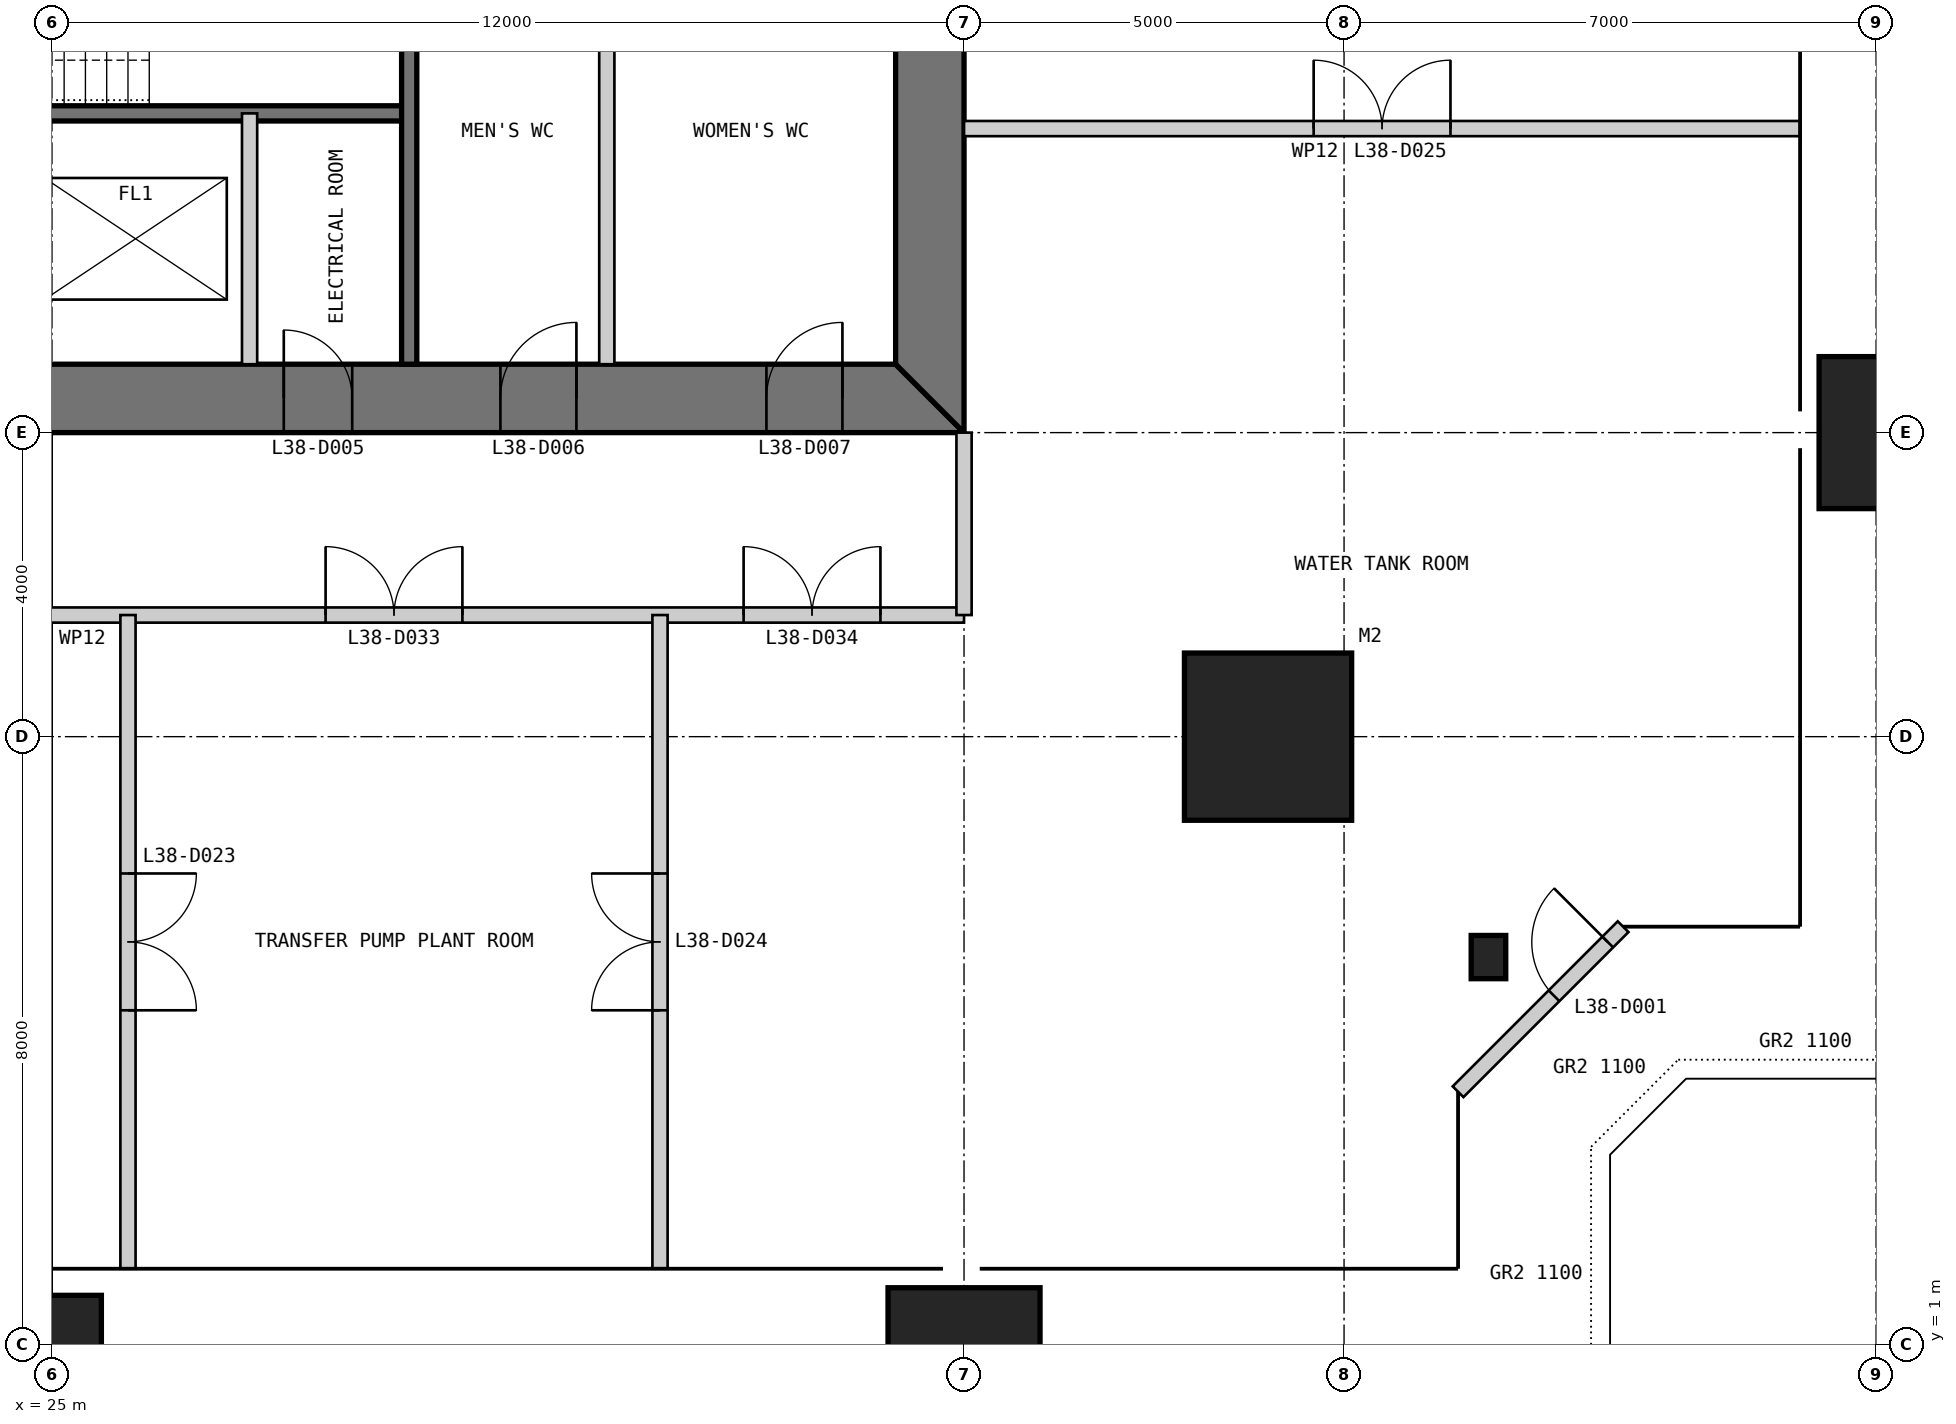
"""IFC4 building model, lengths in metres.
Left out: names, types, materials, properties, quantities, classifications, styles, units other than length and angle.
Written with IfcOpenShell. Run it as: python <this file> out.ifc"""

import sys

from ifc_helpers import new_model, si_unit, direction, frame, frame_2d, origin, origin_2d, place, context, subcontext, project, spatial, polyline, rectangle, i_section, outline, extrude, element, fill, save


model = new_model("IFC4")
c1 = context("Model", 3, precision=1e-05, world=origin(), true_north=direction((0.0, 1.0)))
c2 = subcontext(c1, "Body", "Model", "MODEL_VIEW")
j1 = project(units=[si_unit("LENGTHUNIT", "METRE"), si_unit("PLANEANGLEUNIT", "RADIAN")], contexts=[c1])
p1 = place(None, origin())
s1 = spatial("IfcSite", under=j1, at=p1, CompositionType="ELEMENT")
p2 = place(p1, origin())
s2 = spatial("IfcBuilding", under=s1, at=p2, CompositionType="ELEMENT")
p3 = place(p2, frame((0.0, 0.0, 162.4)))
s3 = spatial("IfcBuildingStorey", under=s2, at=p3, CompositionType="ELEMENT", Elevation=162.4)
p4 = place(p3, frame((41.0, 9.0, 0.0), z_axis=(0.0, 0.0, 1.0), x_axis=(1.0, 0.0, 0.0)))
e1 = element("IfcColumn", 1, at=p4, inside=s3, PredefinedType="COLUMN", context=c2, shape_type="SweptSolid", body=[
    extrude(rectangle(XDim=2.2, YDim=2.2, at=origin_2d()), origin(), (0.0, 0.0, 1.0), 6.0),
])
p5 = place(p3, frame((25.0, 1.0, 0.0), z_axis=(0.0, 0.0, 1.0), x_axis=(1.0, 0.0, 0.0)))
e2 = element("IfcColumn", 2, at=p5, inside=s3, PredefinedType="COLUMN", context=c2, shape_type="SweptSolid", body=[
    extrude(rectangle(XDim=1.3, YDim=1.3, at=origin_2d()), origin(), (0.0, 0.0, 1.0), 6.0),
])
p6 = place(p3, frame((37.0, 1.0, 0.0), z_axis=(0.0, 0.0, 1.0), x_axis=(1.0, 0.0, 0.0)))
e3 = element("IfcColumn", 3, at=p6, inside=s3, PredefinedType="COLUMN", context=c2, shape_type="SweptSolid", body=[
    extrude(rectangle(XDim=2.0, YDim=1.5, at=origin_2d()), origin(), (0.0, 0.0, 1.0), 6.0),
])
p7 = place(p3, frame((49.0, 13.0, 0.0), z_axis=(0.0, 0.0, 1.0), x_axis=(1.0, 0.0, 0.0)))
e4 = element("IfcColumn", 4, at=p7, inside=s3, PredefinedType="COLUMN", context=c2, shape_type="SweptSolid", body=[
    extrude(rectangle(XDim=1.5, YDim=2.0, at=origin_2d()), origin(), (0.0, 0.0, 1.0), 6.0),
])
p8 = place(p3, frame((43.9, 6.1, 0.0), z_axis=(0.0, 0.0, 1.0), x_axis=(1.0, 0.0, 0.0)))
e5 = element("IfcColumn", 5, at=p8, inside=s3, PredefinedType="COLUMN", context=c2, shape_type="SweptSolid", body=[
    extrude(i_section(OverallWidth=0.455, OverallDepth=0.569, WebThickness=0.078, FlangeThickness=0.125, at=origin_2d()), origin(), (0.0, 0.0, 1.0), 4.6),
])
p9 = place(p3, frame((13.0, 13.45, 0.0), z_axis=(0.0, 0.0, 1.0), x_axis=(1.0, 0.0, 0.0)))
e6 = element("IfcWall", 6, at=p9, inside=s3, PredefinedType="SHEAR", context=c2, shape_type="SweptSolid", body=[
    extrude(outline(polyline([(0.0, -0.45), (24.0, -0.45), (23.1, 0.45), (0.9, 0.45), (0.0, -0.45)])), origin(), (0.0, 0.0, 1.0), 6.0),
])
p10 = place(p9, frame((4.9, 0.0, 0.0)))
e7 = element("IfcOpeningElement", 7, at=p10, cuts=e6, PredefinedType="OPENING", context=c2, shape_type="SweptSolid", body=[
    extrude(rectangle(XDim=1.0, YDim=2.2, at=frame_2d((0.5, 1.1))), frame((0.0, 0.46, 0.0), z_axis=(0.0, -1.0, 0.0), x_axis=(1.0, 0.0, 0.0)), (0.0, 0.0, 1.0), 0.92),
])
p11 = place(p9, frame((8.9, 0.0, 0.0)))
e8 = element("IfcOpeningElement", 8, at=p11, cuts=e6, PredefinedType="OPENING", context=c2, shape_type="SweptSolid", body=[
    extrude(rectangle(XDim=1.1, YDim=2.2, at=frame_2d((0.55, 1.1))), frame((0.0, 0.46, 0.0), z_axis=(0.0, -1.0, 0.0), x_axis=(1.0, 0.0, 0.0)), (0.0, 0.0, 1.0), 0.92),
])
p12 = place(p9, frame((15.05, 0.0, 0.0)))
e9 = element("IfcOpeningElement", 9, at=p12, cuts=e6, PredefinedType="OPENING", context=c2, shape_type="SweptSolid", body=[
    extrude(rectangle(XDim=0.9, YDim=2.2, at=frame_2d((0.45, 1.1))), frame((0.0, 0.46, 0.0), z_axis=(0.0, -1.0, 0.0), x_axis=(1.0, 0.0, 0.0)), (0.0, 0.0, 1.0), 0.92),
])
p13 = place(p9, frame((17.9, 0.0, 0.0)))
e10 = element("IfcOpeningElement", 10, at=p13, cuts=e6, PredefinedType="OPENING", context=c2, shape_type="SweptSolid", body=[
    extrude(rectangle(XDim=1.0, YDim=2.2, at=frame_2d((0.5, 1.1))), frame((0.0, 0.46, 0.0), z_axis=(0.0, -1.0, 0.0), x_axis=(1.0, 0.0, 0.0)), (0.0, 0.0, 1.0), 0.92),
])
p14 = place(p9, frame((21.4, 0.0, 0.0)))
e11 = element("IfcOpeningElement", 11, at=p14, cuts=e6, PredefinedType="OPENING", context=c2, shape_type="SweptSolid", body=[
    extrude(rectangle(XDim=1.0, YDim=2.2, at=frame_2d((0.5, 1.1))), frame((0.0, 0.46, 0.0), z_axis=(0.0, -1.0, 0.0), x_axis=(1.0, 0.0, 0.0)), (0.0, 0.0, 1.0), 0.92),
])
p15 = place(p3, frame((36.55, 13.9, 0.0), z_axis=(0.0, 0.0, 1.0), x_axis=(0.0, 1.0, 0.0)))
e12 = element("IfcWall", 12, at=p15, inside=s3, PredefinedType="SHEAR", context=c2, shape_type="SweptSolid", body=[
    extrude(outline(polyline([(-0.9, -0.45), (23.1, -0.45), (22.2, 0.45), (0.0, 0.45), (-0.9, -0.45)])), origin(), (0.0, 0.0, 1.0), 6.0),
])
p16 = place(p15, frame((20.2, 0.0, 0.0)))
e13 = element("IfcOpeningElement", 13, at=p16, cuts=e12, PredefinedType="OPENING", context=c2, shape_type="SweptSolid", body=[
    extrude(rectangle(XDim=1.0, YDim=2.2, at=frame_2d((0.5, 1.1))), frame((0.0, 0.46, 0.0), z_axis=(0.0, -1.0, 0.0), x_axis=(1.0, 0.0, 0.0)), (0.0, 0.0, 1.0), 0.92),
])
p17 = place(p15, frame((17.25, 0.0, 0.0)))
e14 = element("IfcOpeningElement", 14, at=p17, cuts=e12, PredefinedType="OPENING", context=c2, shape_type="SweptSolid", body=[
    extrude(rectangle(XDim=0.9, YDim=2.2, at=frame_2d((0.45, 1.1))), frame((0.0, 0.46, 0.0), z_axis=(0.0, -1.0, 0.0), x_axis=(1.0, 0.0, 0.0)), (0.0, 0.0, 1.0), 0.92),
])
p18 = place(p3, frame((43.5, 4.328, 0.0), z_axis=(0.0, 0.0, 1.0), x_axis=(0.707106781187, 0.707106781187, 0.0)))
e15 = element("IfcWall", 15, at=p18, inside=s3, PredefinedType="SOLIDWALL", context=c2, shape_type="SweptSolid", body=[
    extrude(rectangle(XDim=3.071, YDim=0.2, at=frame_2d((1.536, 0.0))), origin(), (0.0, 0.0, 1.0), 4.6),
])
p19 = place(p18, frame((1.786, 0.0, 0.0)))
e16 = element("IfcOpeningElement", 16, at=p19, cuts=e15, PredefinedType="OPENING", context=c2, shape_type="SweptSolid", body=[
    extrude(rectangle(XDim=1.0, YDim=2.2, at=frame_2d((0.5, 1.1))), frame((0.0, 0.11, 0.0), z_axis=(0.0, -1.0, 0.0), x_axis=(1.0, 0.0, 0.0)), (0.0, 0.0, 1.0), 0.22),
])
p20 = place(p3, frame((20.3, 17.2, 0.0), z_axis=(0.0, 0.0, 1.0), x_axis=(1.0, 0.0, 0.0)))
e17 = element("IfcWall", 17, at=p20, inside=s3, PredefinedType="SOLIDWALL", context=c2, shape_type="SweptSolid", body=[
    extrude(rectangle(XDim=9.4, YDim=0.2, at=frame_2d((4.7, 0.0))), origin(), (0.0, 0.0, 1.0), 5.8),
])
p21 = place(p20, frame((0.25, 0.0, 0.0)))
e18 = element("IfcOpeningElement", 18, at=p21, cuts=e17, PredefinedType="OPENING", context=c2, shape_type="SweptSolid", body=[
    extrude(rectangle(XDim=1.0, YDim=2.2, at=frame_2d((0.5, 1.1))), frame((0.0, 0.11, 0.0), z_axis=(0.0, -1.0, 0.0), x_axis=(1.0, 0.0, 0.0)), (0.0, 0.0, 1.0), 0.22),
])
p22 = place(p3, frame((27.6, 13.9, 0.0), z_axis=(0.0, 0.0, 1.0), x_axis=(0.0, 1.0, 0.0)))
e19 = element("IfcWall", 19, at=p22, inside=s3, PredefinedType="PARTITIONING", context=c2, shape_type="SweptSolid", body=[
    extrude(rectangle(XDim=3.3, YDim=0.2, at=frame_2d((1.65, 0.0))), origin(), (0.0, 0.0, 1.0), 5.8),
])
p23 = place(p3, frame((29.7, 13.9, 0.0), z_axis=(0.0, 0.0, 1.0), x_axis=(0.0, 1.0, 0.0)))
e20 = element("IfcWall", 20, at=p23, inside=s3, PredefinedType="SOLIDWALL", context=c2, shape_type="SweptSolid", body=[
    extrude(rectangle(XDim=6.1, YDim=0.2, at=frame_2d((3.05, 0.0))), origin(), (0.0, 0.0, 1.0), 5.8),
])
p24 = place(p3, frame((32.3, 13.9, 0.0), z_axis=(0.0, 0.0, 1.0), x_axis=(0.0, 1.0, 0.0)))
e21 = element("IfcWall", 21, at=p24, inside=s3, PredefinedType="PARTITIONING", context=c2, shape_type="SweptSolid", body=[
    extrude(rectangle(XDim=6.1, YDim=0.2, at=frame_2d((3.05, 0.0))), origin(), (0.0, 0.0, 1.0), 5.8),
])
p25 = place(p3, frame((13.0, 10.6, 0.0), z_axis=(0.0, 0.0, 1.0), x_axis=(1.0, 0.0, 0.0)))
e22 = element("IfcWall", 22, at=p25, inside=s3, PredefinedType="PARTITIONING", context=c2, shape_type="SweptSolid", body=[
    extrude(rectangle(XDim=24.0, YDim=0.2, at=frame_2d((12.0, 0.0))), origin(), (0.0, 0.0, 1.0), 5.8),
])
p26 = place(p25, frame((1.05, 0.0, 0.0)))
e23 = element("IfcOpeningElement", 23, at=p26, cuts=e22, PredefinedType="OPENING", context=c2, shape_type="SweptSolid", body=[
    extrude(rectangle(XDim=0.9, YDim=2.2, at=frame_2d((0.45, 1.1))), frame((0.0, 0.11, 0.0), z_axis=(0.0, -1.0, 0.0), x_axis=(1.0, 0.0, 0.0)), (0.0, 0.0, 1.0), 0.22),
])
p27 = place(p25, frame((7.1, 0.0, 0.0)))
e24 = element("IfcOpeningElement", 24, at=p27, cuts=e22, PredefinedType="OPENING", context=c2, shape_type="SweptSolid", body=[
    extrude(rectangle(XDim=1.8, YDim=2.4, at=frame_2d((0.9, 1.2))), frame((0.0, 0.11, 0.0), z_axis=(0.0, -1.0, 0.0), x_axis=(1.0, 0.0, 0.0)), (0.0, 0.0, 1.0), 0.22),
])
p28 = place(p25, frame((15.6, 0.0, 0.0)))
e25 = element("IfcOpeningElement", 25, at=p28, cuts=e22, PredefinedType="OPENING", context=c2, shape_type="SweptSolid", body=[
    extrude(rectangle(XDim=1.8, YDim=2.4, at=frame_2d((0.9, 1.2))), frame((0.0, 0.11, 0.0), z_axis=(0.0, -1.0, 0.0), x_axis=(1.0, 0.0, 0.0)), (0.0, 0.0, 1.0), 0.22),
])
p29 = place(p25, frame((21.1, 0.0, 0.0)))
e26 = element("IfcOpeningElement", 26, at=p29, cuts=e22, PredefinedType="OPENING", context=c2, shape_type="SweptSolid", body=[
    extrude(rectangle(XDim=1.8, YDim=2.4, at=frame_2d((0.9, 1.2))), frame((0.0, 0.11, 0.0), z_axis=(0.0, -1.0, 0.0), x_axis=(1.0, 0.0, 0.0)), (0.0, 0.0, 1.0), 0.22),
])
p30 = place(p3, frame((37.0, 10.6, 0.0), z_axis=(0.0, 0.0, 1.0), x_axis=(0.0, 1.0, 0.0)))
e27 = element("IfcWall", 27, at=p30, inside=s3, PredefinedType="PARTITIONING", context=c2, shape_type="SweptSolid", body=[
    extrude(rectangle(XDim=2.4, YDim=0.2, at=frame_2d((1.2, 0.0))), origin(), (0.0, 0.0, 1.0), 4.807),
])
p31 = place(p3, frame((26.0, 2.0, 0.0), z_axis=(0.0, 0.0, 1.0), x_axis=(0.0, 1.0, 0.0)))
e28 = element("IfcWall", 28, at=p31, inside=s3, PredefinedType="PARTITIONING", context=c2, shape_type="SweptSolid", body=[
    extrude(rectangle(XDim=8.6, YDim=0.2, at=frame_2d((4.3, 0.0))), origin(), (0.0, 0.0, 1.0), 5.8),
])
p32 = place(p31, frame((3.4, 0.0, 0.0)))
e29 = element("IfcOpeningElement", 29, at=p32, cuts=e28, PredefinedType="OPENING", context=c2, shape_type="SweptSolid", body=[
    extrude(rectangle(XDim=1.8, YDim=2.4, at=frame_2d((0.9, 1.2))), frame((0.0, 0.11, 0.0), z_axis=(0.0, -1.0, 0.0), x_axis=(1.0, 0.0, 0.0)), (0.0, 0.0, 1.0), 0.22),
])
p33 = place(p3, frame((33.0, 2.0, 0.0), z_axis=(0.0, 0.0, 1.0), x_axis=(0.0, 1.0, 0.0)))
e30 = element("IfcWall", 30, at=p33, inside=s3, PredefinedType="PARTITIONING", context=c2, shape_type="SweptSolid", body=[
    extrude(rectangle(XDim=8.6, YDim=0.2, at=frame_2d((4.3, 0.0))), origin(), (0.0, 0.0, 1.0), 5.8),
])
p34 = place(p33, frame((3.4, 0.0, 0.0)))
e31 = element("IfcOpeningElement", 31, at=p34, cuts=e30, PredefinedType="OPENING", context=c2, shape_type="SweptSolid", body=[
    extrude(rectangle(XDim=1.8, YDim=2.4, at=frame_2d((0.9, 1.2))), frame((0.0, 0.11, 0.0), z_axis=(0.0, -1.0, 0.0), x_axis=(1.0, 0.0, 0.0)), (0.0, 0.0, 1.0), 0.22),
])
p35 = place(p3, frame((37.0, 17.0, 0.0), z_axis=(0.0, 0.0, 1.0), x_axis=(1.0, 0.0, 0.0)))
e32 = element("IfcWall", 32, at=p35, inside=s3, PredefinedType="PARTITIONING", context=c2, shape_type="SweptSolid", body=[
    extrude(rectangle(XDim=11.0, YDim=0.2, at=frame_2d((5.5, 0.0))), origin(), (0.0, 0.0, 1.0), 5.8),
])
p36 = place(p35, frame((4.6, 0.0, 0.0)))
e33 = element("IfcOpeningElement", 33, at=p36, cuts=e32, PredefinedType="OPENING", context=c2, shape_type="SweptSolid", body=[
    extrude(rectangle(XDim=1.8, YDim=2.4, at=frame_2d((0.9, 1.2))), frame((0.0, 0.11, 0.0), z_axis=(0.0, -1.0, 0.0), x_axis=(1.0, 0.0, 0.0)), (0.0, 0.0, 1.0), 0.22),
])
p37 = place(p19, origin())
e34 = element("IfcDoor", 34, at=p37, inside=s3, OperationType="SINGLE_SWING_RIGHT", PredefinedType="DOOR", context=c2, shape_type="SweptSolid", body=[
    extrude(rectangle(XDim=1.0, YDim=2.2, at=frame_2d((0.5, 1.1))), frame((0.0, 0.025, 0.0), z_axis=(0.0, -1.0, 0.0), x_axis=(1.0, 0.0, 0.0)), (0.0, 0.0, 1.0), 0.05),
])
fill(e16, e34)
p38 = place(p12, origin())
e35 = element("IfcDoor", 35, at=p38, inside=s3, OperationType="SINGLE_SWING_LEFT", PredefinedType="DOOR", context=c2, shape_type="SweptSolid", body=[
    extrude(rectangle(XDim=0.9, YDim=2.2, at=frame_2d((0.45, 1.1))), frame((0.0, 0.025, 0.0), z_axis=(0.0, -1.0, 0.0), x_axis=(1.0, 0.0, 0.0)), (0.0, 0.0, 1.0), 0.05),
    extrude(outline(polyline([(0.0, 0.0), (0.04, 0.0), (0.04, 2.16), (0.86, 2.16), (0.86, 0.0), (0.9, 0.0), (0.9, 2.2), (0.0, 2.2), (0.0, 0.0)])), frame((0.0, 0.3, 0.0), z_axis=(0.0, -1.0, 0.0), x_axis=(1.0, 0.0, 0.0)), (0.0, 0.0, 1.0), 0.6),
])
fill(e9, e35)
p39 = place(p13, origin())
e36 = element("IfcDoor", 36, at=p39, inside=s3, OperationType="SINGLE_SWING_RIGHT", PredefinedType="DOOR", context=c2, shape_type="SweptSolid", body=[
    extrude(rectangle(XDim=1.0, YDim=2.2, at=frame_2d((0.5, 1.1))), frame((0.0, 0.025, 0.0), z_axis=(0.0, -1.0, 0.0), x_axis=(1.0, 0.0, 0.0)), (0.0, 0.0, 1.0), 0.05),
    extrude(outline(polyline([(0.0, 0.0), (0.04, 0.0), (0.04, 2.16), (0.96, 2.16), (0.96, 0.0), (1.0, 0.0), (1.0, 2.2), (0.0, 2.2), (0.0, 0.0)])), frame((0.0, 0.3, 0.0), z_axis=(0.0, -1.0, 0.0), x_axis=(1.0, 0.0, 0.0)), (0.0, 0.0, 1.0), 0.6),
])
fill(e10, e36)
p40 = place(p14, origin())
e37 = element("IfcDoor", 37, at=p40, inside=s3, OperationType="SINGLE_SWING_RIGHT", PredefinedType="DOOR", context=c2, shape_type="SweptSolid", body=[
    extrude(rectangle(XDim=1.0, YDim=2.2, at=frame_2d((0.5, 1.1))), frame((0.0, 0.025, 0.0), z_axis=(0.0, -1.0, 0.0), x_axis=(1.0, 0.0, 0.0)), (0.0, 0.0, 1.0), 0.05),
    extrude(outline(polyline([(0.0, 0.0), (0.04, 0.0), (0.04, 2.16), (0.96, 2.16), (0.96, 0.0), (1.0, 0.0), (1.0, 2.2), (0.0, 2.2), (0.0, 0.0)])), frame((0.0, 0.3, 0.0), z_axis=(0.0, -1.0, 0.0), x_axis=(1.0, 0.0, 0.0)), (0.0, 0.0, 1.0), 0.6),
])
fill(e11, e37)
p41 = place(p32, frame((1.8, 0.0, 0.0), z_axis=(0.0, 0.0, 1.0), x_axis=(-1.0, 0.0, 0.0)))
e38 = element("IfcDoor", 38, at=p41, inside=s3, OperationType="DOUBLE_DOOR_SINGLE_SWING", PredefinedType="DOOR", context=c2, shape_type="SweptSolid", body=[
    extrude(rectangle(XDim=1.8, YDim=2.4, at=frame_2d((0.9, 1.2))), frame((0.0, 0.025, 0.0), z_axis=(0.0, -1.0, 0.0), x_axis=(1.0, 0.0, 0.0)), (0.0, 0.0, 1.0), 0.05),
])
fill(e29, e38)
p42 = place(p34, origin())
e39 = element("IfcDoor", 39, at=p42, inside=s3, OperationType="DOUBLE_DOOR_SINGLE_SWING", PredefinedType="DOOR", context=c2, shape_type="SweptSolid", body=[
    extrude(rectangle(XDim=1.8, YDim=2.4, at=frame_2d((0.9, 1.2))), frame((0.0, 0.025, 0.0), z_axis=(0.0, -1.0, 0.0), x_axis=(1.0, 0.0, 0.0)), (0.0, 0.0, 1.0), 0.05),
])
fill(e31, e39)
p43 = place(p36, origin())
e40 = element("IfcDoor", 40, at=p43, inside=s3, OperationType="DOUBLE_DOOR_SINGLE_SWING", PredefinedType="DOOR", context=c2, shape_type="SweptSolid", body=[
    extrude(rectangle(XDim=1.8, YDim=2.4, at=frame_2d((0.9, 1.2))), frame((0.0, 0.025, 0.0), z_axis=(0.0, -1.0, 0.0), x_axis=(1.0, 0.0, 0.0)), (0.0, 0.0, 1.0), 0.05),
])
fill(e33, e40)
p44 = place(p28, origin())
e41 = element("IfcDoor", 41, at=p44, inside=s3, OperationType="DOUBLE_DOOR_SINGLE_SWING", PredefinedType="DOOR", context=c2, shape_type="SweptSolid", body=[
    extrude(rectangle(XDim=1.8, YDim=2.4, at=frame_2d((0.9, 1.2))), frame((0.0, 0.025, 0.0), z_axis=(0.0, -1.0, 0.0), x_axis=(1.0, 0.0, 0.0)), (0.0, 0.0, 1.0), 0.05),
])
fill(e25, e41)
p45 = place(p29, origin())
e42 = element("IfcDoor", 42, at=p45, inside=s3, OperationType="DOUBLE_DOOR_SINGLE_SWING", PredefinedType="DOOR", context=c2, shape_type="SweptSolid", body=[
    extrude(rectangle(XDim=1.8, YDim=2.4, at=frame_2d((0.9, 1.2))), frame((0.0, 0.025, 0.0), z_axis=(0.0, -1.0, 0.0), x_axis=(1.0, 0.0, 0.0)), (0.0, 0.0, 1.0), 0.05),
])
fill(e26, e42)
save(model, sys.argv[1])
